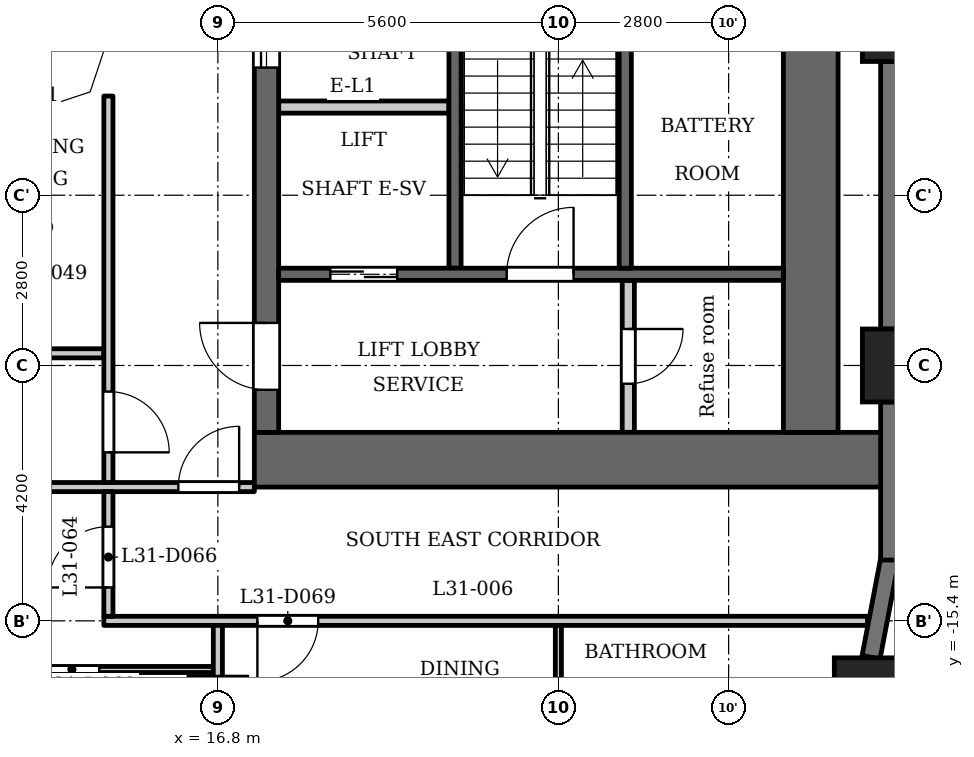
"""IFC4 building model, lengths in metres.
Left out: names, types, materials, properties, quantities, classifications, styles, units other than length and angle.
Written with IfcOpenShell. Run it as: python <this file> out.ifc"""

import sys

from ifc_helpers import new_model, si_unit, direction, frame, frame_2d, origin, origin_2d, place, context, subcontext, project, spatial, polyline, rectangle, outline, extrude, element, fill, save


model = new_model("IFC4")
c1 = context("Model", 3, precision=1e-05, world=origin(), true_north=direction((0.0, 1.0)))
c2 = subcontext(c1, "Body", "Model", "MODEL_VIEW")
j1 = project(units=[si_unit("LENGTHUNIT", "METRE"), si_unit("PLANEANGLEUNIT", "RADIAN")], contexts=[c1])
p1 = place(None, origin())
s1 = spatial("IfcSite", under=j1, at=p1, CompositionType="ELEMENT")
p2 = place(p1, origin())
s2 = spatial("IfcBuilding", under=s1, at=p2, CompositionType="ELEMENT")
p3 = place(p2, frame((0.0, 0.0, 121.8)))
s3 = spatial("IfcBuildingStorey", under=s2, at=p3, CompositionType="ELEMENT", Elevation=121.8)
for number, where, z_axis, x_axis in (
    (1, (27.538, -16.609, 0.0), (0.0, 0.0, 1.0), (1.0, 0.0, 0.0)),
    (2, (28.0, -11.2, 0.0), (0.0, 0.0, 1.0), (1.0, 0.0, 0.0)),
    (3, (28.0, -5.6, 0.0), (0.0, 0.0, 1.0), (1.0, 0.0, 0.0)),
):
    element("IfcColumn", number, at=place(p3, frame(where, z_axis=z_axis, x_axis=x_axis)), inside=s3, PredefinedType="COLUMN", context=c2, shape_type="SweptSolid", body=[
        extrude(rectangle(XDim=1.2, YDim=1.2, at=origin_2d()), origin(), (0.0, 0.0, 1.0), 3.5),
    ])
p4 = place(p3, frame((16.8, -16.8, 0.0), z_axis=(0.0, 0.0, 1.0), x_axis=(1.0, 0.0, 0.0)))
e4 = element("IfcColumn", 4, at=p4, inside=s3, PredefinedType="COLUMN", context=c2, shape_type="SweptSolid", body=[
    extrude(rectangle(XDim=0.95, YDim=0.95, at=origin_2d()), origin(), (0.0, 0.0, 1.0), 3.5),
])
p5 = place(p3, frame((27.542, -15.999, 0.0), z_axis=(0.0, 0.0, 1.0), x_axis=(0.187349172861, 0.982293381546, 0.0)))
e5 = element("IfcWall", 5, at=p5, inside=s3, PredefinedType="SOLIDWALL", context=c2, shape_type="SweptSolid", body=[
    extrude(rectangle(XDim=1.656, YDim=0.3, at=frame_2d((0.828, 0.0))), origin(), (0.0, 0.0, 1.0), 2.35),
])
p6 = place(p3, frame((27.85, -14.4, 0.0), z_axis=(0.0, 0.0, 1.0), x_axis=(0.0, 1.0, 0.0)))
e6 = element("IfcWall", 6, at=p6, inside=s3, PredefinedType="SOLIDWALL", context=c2, shape_type="SweptSolid", body=[
    extrude(rectangle(XDim=2.6, YDim=0.3, at=frame_2d((1.3, 0.0))), origin(), (0.0, 0.0, 1.0), 2.35),
])
p7 = place(p3, frame((27.85, -10.6, 0.0), z_axis=(0.0, 0.0, 1.0), x_axis=(0.0, 1.0, 0.0)))
e7 = element("IfcWall", 7, at=p7, inside=s3, PredefinedType="SOLIDWALL", context=c2, shape_type="SweptSolid", body=[
    extrude(rectangle(XDim=4.4, YDim=0.3, at=frame_2d((2.2, 0.0))), origin(), (0.0, 0.0, 1.0), 2.35),
])
p8 = place(p3, frame((20.7, -9.6, 0.0), z_axis=(0.0, 0.0, 1.0), x_axis=(0.0, 1.0, 0.0)))
e8 = element("IfcWall", 8, at=p8, inside=s3, PredefinedType="SHEAR", context=c2, shape_type="SweptSolid", body=[
    extrude(rectangle(XDim=9.75, YDim=0.2, at=frame_2d((4.875, 0.0))), origin(), (0.0, 0.0, 1.0), 3.15),
])
p9 = place(p3, frame((17.4, -12.75, 0.0), z_axis=(0.0, 0.0, 1.0), x_axis=(1.0, 0.0, 0.0)))
e9 = element("IfcWall", 9, at=p9, inside=s3, PredefinedType="SHEAR", context=c2, shape_type="SweptSolid", body=[
    extrude(rectangle(XDim=10.4, YDim=0.9, at=frame_2d((5.2, 0.0))), origin(), (0.0, 0.0, 1.0), 3.15),
])
p10 = place(p3, frame((17.6, -12.3, 0.0), z_axis=(0.0, 0.0, 1.0), x_axis=(0.0, 1.0, 0.0)))
e10 = element("IfcWall", 10, at=p10, inside=s3, PredefinedType="SHEAR", context=c2, shape_type="SweptSolid", body=[
    extrude(rectangle(XDim=24.6, YDim=0.4, at=frame_2d((12.3, 0.0))), origin(), (0.0, 0.0, 1.0), 3.15),
])
p11 = place(p10, frame((6.0, 0.0, 0.0)))
e11 = element("IfcOpeningElement", 11, at=p11, cuts=e10, PredefinedType="OPENING", context=c2, shape_type="SweptSolid", body=[
    extrude(rectangle(XDim=1.1, YDim=2.1, at=frame_2d((0.55, 1.05))), frame((0.0, 0.21, 0.0), z_axis=(0.0, -1.0, 0.0), x_axis=(1.0, 0.0, 0.0)), (0.0, 0.0, 1.0), 0.42),
])
p12 = place(p10, frame((8.4, 0.0, 0.0)))
e12 = element("IfcOpeningElement", 12, at=p12, cuts=e10, PredefinedType="OPENING", context=c2, shape_type="SweptSolid", body=[
    extrude(rectangle(XDim=1.1, YDim=2.1, at=frame_2d((0.55, 1.05))), frame((0.0, 0.21, 0.0), z_axis=(0.0, -1.0, 0.0), x_axis=(1.0, 0.0, 0.0)), (0.0, 0.0, 1.0), 0.42),
])
p13 = place(p10, frame((10.8, 0.0, 0.0)))
e13 = element("IfcOpeningElement", 13, at=p13, cuts=e10, PredefinedType="OPENING", context=c2, shape_type="SweptSolid", body=[
    extrude(rectangle(XDim=1.1, YDim=2.1, at=frame_2d((0.55, 1.05))), frame((0.0, 0.21, 0.0), z_axis=(0.0, -1.0, 0.0), x_axis=(1.0, 0.0, 0.0)), (0.0, 0.0, 1.0), 0.42),
])
p14 = place(p10, frame((22.8, 0.0, 0.0)))
e14 = element("IfcOpeningElement", 14, at=p14, cuts=e10, PredefinedType="OPENING", context=c2, shape_type="SweptSolid", body=[
    extrude(rectangle(XDim=1.1, YDim=2.1, at=frame_2d((0.55, 1.05))), frame((0.0, 0.21, 0.0), z_axis=(0.0, -1.0, 0.0), x_axis=(1.0, 0.0, 0.0)), (0.0, 0.0, 1.0), 0.42),
])
p15 = place(p10, frame((0.7, 0.0, 0.0)))
e15 = element("IfcOpeningElement", 15, at=p15, cuts=e10, PredefinedType="OPENING", context=c2, shape_type="SweptSolid", body=[
    extrude(rectangle(XDim=1.1, YDim=2.1, at=frame_2d((0.55, 1.05))), frame((0.0, 0.21, 0.0), z_axis=(0.0, -1.0, 0.0), x_axis=(1.0, 0.0, 0.0)), (0.0, 0.0, 1.0), 0.42),
])
p16 = place(p10, frame((12.775, 0.0, 0.0)))
e16 = element("IfcOpeningElement", 16, at=p16, cuts=e10, PredefinedType="OPENING", context=c2, shape_type="SweptSolid", body=[
    extrude(rectangle(XDim=1.8, YDim=2.1, at=frame_2d((0.9, 1.05))), frame((0.0, 0.21, 0.0), z_axis=(0.0, -1.0, 0.0), x_axis=(1.0, 0.0, 0.0)), (0.0, 0.0, 1.0), 0.42),
])
p17 = place(p3, frame((26.55, -12.3, 0.0), z_axis=(0.0, 0.0, 1.0), x_axis=(0.0, 1.0, 0.0)))
e17 = element("IfcWall", 17, at=p17, inside=s3, PredefinedType="SHEAR", context=c2, shape_type="SweptSolid", body=[
    extrude(rectangle(XDim=24.6, YDim=0.9, at=frame_2d((12.3, 0.0))), origin(), (0.0, 0.0, 1.0), 3.15),
])
p18 = place(p3, frame((23.55, -12.3, 0.0), z_axis=(0.0, 0.0, 1.0), x_axis=(0.0, 1.0, 0.0)))
e18 = element("IfcWall", 18, at=p18, inside=s3, PredefinedType="PARTITIONING", context=c2, shape_type="SweptSolid", body=[
    extrude(rectangle(XDim=2.5, YDim=0.2, at=frame_2d((1.25, 0.0))), origin(), (0.0, 0.0, 1.0), 3.15),
])
p19 = place(p18, frame((0.8, 0.0, 0.0)))
e19 = element("IfcOpeningElement", 19, at=p19, cuts=e18, PredefinedType="OPENING", context=c2, shape_type="SweptSolid", body=[
    extrude(rectangle(XDim=0.9, YDim=2.1, at=frame_2d((0.45, 1.05))), frame((0.0, 0.11, 0.0), z_axis=(0.0, -1.0, 0.0), x_axis=(1.0, 0.0, 0.0)), (0.0, 0.0, 1.0), 0.22),
])
p20 = place(p3, frame((17.8, -9.7, 0.0), z_axis=(0.0, 0.0, 1.0), x_axis=(1.0, 0.0, 0.0)))
e20 = element("IfcWall", 20, at=p20, inside=s3, PredefinedType="SHEAR", context=c2, shape_type="SweptSolid", body=[
    extrude(rectangle(XDim=8.3, YDim=0.2, at=frame_2d((4.15, 0.0))), origin(), (0.0, 0.0, 1.0), 3.15),
])
p21 = place(p20, frame((0.85, 0.0, 0.0)))
e21 = element("IfcOpeningElement", 21, at=p21, cuts=e20, PredefinedType="OPENING", context=c2, shape_type="SweptSolid", body=[
    extrude(rectangle(XDim=1.1, YDim=2.1, at=frame_2d((0.55, 1.05))), frame((0.0, 0.11, 0.0), z_axis=(0.0, -1.0, 0.0), x_axis=(1.0, 0.0, 0.0)), (0.0, 0.0, 1.0), 0.22),
])
p22 = place(p20, frame((3.75, 0.0, 0.0)))
e22 = element("IfcOpeningElement", 22, at=p22, cuts=e20, PredefinedType="OPENING", context=c2, shape_type="SweptSolid", body=[
    extrude(rectangle(XDim=1.1, YDim=2.1, at=frame_2d((0.55, 1.05))), frame((0.0, 0.11, 0.0), z_axis=(0.0, -1.0, 0.0), x_axis=(1.0, 0.0, 0.0)), (0.0, 0.0, 1.0), 0.22),
])
p23 = place(p3, frame((17.8, -6.95, 0.0), z_axis=(0.0, 0.0, 1.0), x_axis=(1.0, 0.0, 0.0)))
e23 = element("IfcWall", 23, at=p23, inside=s3, PredefinedType="PARTITIONING", context=c2, shape_type="SweptSolid", body=[
    extrude(rectangle(XDim=2.8, YDim=0.2, at=frame_2d((1.4, 0.0))), origin(), (0.0, 0.0, 1.0), 3.15),
])
p24 = place(p3, frame((23.5, -9.6, 0.0), z_axis=(0.0, 0.0, 1.0), x_axis=(0.0, 1.0, 0.0)))
e24 = element("IfcWall", 24, at=p24, inside=s3, PredefinedType="SHEAR", context=c2, shape_type="SweptSolid", body=[
    extrude(rectangle(XDim=6.9, YDim=0.2, at=frame_2d((3.45, 0.0))), origin(), (0.0, 0.0, 1.0), 3.15),
])
p25 = place(p3, frame((-16.725, -16.2, 0.0), z_axis=(0.0, 0.0, 1.0), x_axis=(1.0, 0.0, 0.0)))
e25 = element("IfcWall", 25, at=p25, inside=s3, PredefinedType="PARTITIONING", context=c2, shape_type="SweptSolid", body=[
    extrude(rectangle(XDim=33.45, YDim=0.1, at=frame_2d((16.725, 0.0))), origin(), (0.0, 0.0, 1.0), 3.15),
])
p26 = place(p25, frame((4.075, 0.0, 0.0)))
e26 = element("IfcOpeningElement", 26, at=p26, cuts=e25, PredefinedType="OPENING", context=c2, shape_type="SweptSolid", body=[
    extrude(rectangle(XDim=0.8, YDim=2.1, at=frame_2d((0.4, 1.05))), frame((0.0, 0.06, 0.0), z_axis=(0.0, -1.0, 0.0), x_axis=(1.0, 0.0, 0.0)), (0.0, 0.0, 1.0), 0.12),
])
p27 = place(p25, frame((9.425, 0.0, 0.0)))
e27 = element("IfcOpeningElement", 27, at=p27, cuts=e25, PredefinedType="OPENING", context=c2, shape_type="SweptSolid", body=[
    extrude(rectangle(XDim=0.9, YDim=2.1, at=frame_2d((0.45, 1.05))), frame((0.0, 0.06, 0.0), z_axis=(0.0, -1.0, 0.0), x_axis=(1.0, 0.0, 0.0)), (0.0, 0.0, 1.0), 0.12),
])
p28 = place(p25, frame((19.875, 0.0, 0.0)))
e28 = element("IfcOpeningElement", 28, at=p28, cuts=e25, PredefinedType="OPENING", context=c2, shape_type="SweptSolid", body=[
    extrude(rectangle(XDim=0.8, YDim=2.1, at=frame_2d((0.4, 1.05))), frame((0.0, 0.06, 0.0), z_axis=(0.0, -1.0, 0.0), x_axis=(1.0, 0.0, 0.0)), (0.0, 0.0, 1.0), 0.12),
])
p29 = place(p25, frame((17.375, 0.0, 0.0)))
e29 = element("IfcOpeningElement", 29, at=p29, cuts=e25, PredefinedType="OPENING", context=c2, shape_type="SweptSolid", body=[
    extrude(rectangle(XDim=0.9, YDim=2.1, at=frame_2d((0.45, 1.05))), frame((0.0, 0.06, 0.0), z_axis=(0.0, -1.0, 0.0), x_axis=(1.0, 0.0, 0.0)), (0.0, 0.0, 1.0), 0.12),
])
p30 = place(p25, frame((12.525, 0.0, 0.0)))
e30 = element("IfcOpeningElement", 30, at=p30, cuts=e25, PredefinedType="OPENING", context=c2, shape_type="SweptSolid", body=[
    extrude(rectangle(XDim=0.9, YDim=2.1, at=frame_2d((0.45, 1.05))), frame((0.0, 0.06, 0.0), z_axis=(0.0, -1.0, 0.0), x_axis=(1.0, 0.0, 0.0)), (0.0, 0.0, 1.0), 0.12),
])
p31 = place(p25, frame((14.775, 0.0, 0.0)))
e31 = element("IfcOpeningElement", 31, at=p31, cuts=e25, PredefinedType="OPENING", context=c2, shape_type="SweptSolid", body=[
    extrude(rectangle(XDim=0.9, YDim=2.1, at=frame_2d((0.45, 1.05))), frame((0.0, 0.06, 0.0), z_axis=(0.0, -1.0, 0.0), x_axis=(1.0, 0.0, 0.0)), (0.0, 0.0, 1.0), 0.12),
])
p32 = place(p25, frame((26.475, 0.0, 0.0)))
e32 = element("IfcOpeningElement", 32, at=p32, cuts=e25, PredefinedType="OPENING", context=c2, shape_type="SweptSolid", body=[
    extrude(rectangle(XDim=0.8, YDim=2.1, at=frame_2d((0.4, 1.05))), frame((0.0, 0.06, 0.0), z_axis=(0.0, -1.0, 0.0), x_axis=(1.0, 0.0, 0.0)), (0.0, 0.0, 1.0), 0.12),
])
p33 = place(p25, frame((23.725, 0.0, 0.0)))
e33 = element("IfcOpeningElement", 33, at=p33, cuts=e25, PredefinedType="OPENING", context=c2, shape_type="SweptSolid", body=[
    extrude(rectangle(XDim=0.9, YDim=2.1, at=frame_2d((0.45, 1.05))), frame((0.0, 0.06, 0.0), z_axis=(0.0, -1.0, 0.0), x_axis=(1.0, 0.0, 0.0)), (0.0, 0.0, 1.0), 0.12),
])
p34 = place(p25, frame((29.075, 0.0, 0.0)))
e34 = element("IfcOpeningElement", 34, at=p34, cuts=e25, PredefinedType="OPENING", context=c2, shape_type="SweptSolid", body=[
    extrude(rectangle(XDim=0.8, YDim=2.1, at=frame_2d((0.4, 1.05))), frame((0.0, 0.06, 0.0), z_axis=(0.0, -1.0, 0.0), x_axis=(1.0, 0.0, 0.0)), (0.0, 0.0, 1.0), 0.12),
])
p35 = place(p25, frame((30.675, 0.0, 0.0)))
e35 = element("IfcOpeningElement", 35, at=p35, cuts=e25, PredefinedType="OPENING", context=c2, shape_type="SweptSolid", body=[
    extrude(rectangle(XDim=0.9, YDim=2.1, at=frame_2d((0.45, 1.05))), frame((0.0, 0.06, 0.0), z_axis=(0.0, -1.0, 0.0), x_axis=(1.0, 0.0, 0.0)), (0.0, 0.0, 1.0), 0.12),
])
p36 = place(p3, frame((14.925, -15.4, 0.0), z_axis=(0.0, 0.0, 1.0), x_axis=(1.0, 0.0, 0.0)))
e36 = element("IfcWall", 36, at=p36, inside=s3, PredefinedType="PARTITIONING", context=c2, shape_type="SweptSolid", body=[
    extrude(rectangle(XDim=12.559, YDim=0.15, at=frame_2d((6.279, 0.0))), origin(), (0.0, 0.0, 1.0), 3.15),
])
p37 = place(p36, frame((2.525, 0.0, 0.0)))
e37 = element("IfcOpeningElement", 37, at=p37, cuts=e36, PredefinedType="OPENING", context=c2, shape_type="SweptSolid", body=[
    extrude(rectangle(XDim=1.0, YDim=2.1, at=frame_2d((0.5, 1.05))), frame((0.0, 0.085, 0.0), z_axis=(0.0, -1.0, 0.0), x_axis=(1.0, 0.0, 0.0)), (0.0, 0.0, 1.0), 0.17),
])
p38 = place(p3, frame((-17.4, -13.2, 0.0), z_axis=(0.0, 0.0, 1.0), x_axis=(1.0, 0.0, 0.0)))
e38 = element("IfcWall", 38, at=p38, inside=s3, PredefinedType="PARTITIONING", context=c2, shape_type="SweptSolid", body=[
    extrude(rectangle(XDim=34.8, YDim=0.15, at=frame_2d((17.4, 0.0))), origin(), (0.0, 0.0, 1.0), 3.15),
])
p39 = place(p38, frame((0.15, 0.0, 0.0)))
e39 = element("IfcOpeningElement", 39, at=p39, cuts=e38, PredefinedType="OPENING", context=c2, shape_type="SweptSolid", body=[
    extrude(rectangle(XDim=1.0, YDim=2.1, at=frame_2d((0.5, 1.05))), frame((0.0, 0.085, 0.0), z_axis=(0.0, -1.0, 0.0), x_axis=(1.0, 0.0, 0.0)), (0.0, 0.0, 1.0), 0.17),
])
p40 = place(p38, frame((33.55, 0.0, 0.0)))
e40 = element("IfcOpeningElement", 40, at=p40, cuts=e38, PredefinedType="OPENING", context=c2, shape_type="SweptSolid", body=[
    extrude(rectangle(XDim=1.0, YDim=2.1, at=frame_2d((0.5, 1.05))), frame((0.0, 0.085, 0.0), z_axis=(0.0, -1.0, 0.0), x_axis=(1.0, 0.0, 0.0)), (0.0, 0.0, 1.0), 0.17),
])
p41 = place(p38, frame((10.1, 0.0, 0.0)))
e41 = element("IfcOpeningElement", 41, at=p41, cuts=e38, PredefinedType="OPENING", context=c2, shape_type="SweptSolid", body=[
    extrude(rectangle(XDim=1.0, YDim=2.1, at=frame_2d((0.5, 1.05))), frame((0.0, 0.085, 0.0), z_axis=(0.0, -1.0, 0.0), x_axis=(1.0, 0.0, 0.0)), (0.0, 0.0, 1.0), 0.17),
])
p42 = place(p38, frame((15.7, 0.0, 0.0)))
e42 = element("IfcOpeningElement", 42, at=p42, cuts=e38, PredefinedType="OPENING", context=c2, shape_type="SweptSolid", body=[
    extrude(rectangle(XDim=1.0, YDim=2.1, at=frame_2d((0.5, 1.05))), frame((0.0, 0.085, 0.0), z_axis=(0.0, -1.0, 0.0), x_axis=(1.0, 0.0, 0.0)), (0.0, 0.0, 1.0), 0.17),
])
p43 = place(p38, frame((24.9, 0.0, 0.0)))
e43 = element("IfcOpeningElement", 43, at=p43, cuts=e38, PredefinedType="OPENING", context=c2, shape_type="SweptSolid", body=[
    extrude(rectangle(XDim=1.0, YDim=2.1, at=frame_2d((0.5, 1.05))), frame((0.0, 0.085, 0.0), z_axis=(0.0, -1.0, 0.0), x_axis=(1.0, 0.0, 0.0)), (0.0, 0.0, 1.0), 0.17),
])
p44 = place(p3, frame((-14.925, -11.0, 0.0), z_axis=(0.0, 0.0, 1.0), x_axis=(1.0, 0.0, 0.0)))
e44 = element("IfcWall", 44, at=p44, inside=s3, PredefinedType="PARTITIONING", context=c2, shape_type="SweptSolid", body=[
    extrude(rectangle(XDim=29.85, YDim=0.15, at=frame_2d((14.925, 0.0))), origin(), (0.0, 0.0, 1.0), 3.15),
])
p45 = place(p44, frame((5.275, 0.0, 0.0)))
e45 = element("IfcOpeningElement", 45, at=p45, cuts=e44, PredefinedType="OPENING", context=c2, shape_type="SweptSolid", body=[
    extrude(rectangle(XDim=1.0, YDim=2.1, at=frame_2d((0.5, 1.05))), frame((0.0, 0.085, 0.0), z_axis=(0.0, -1.0, 0.0), x_axis=(1.0, 0.0, 0.0)), (0.0, 0.0, 1.0), 0.17),
])
p46 = place(p44, frame((15.475, 0.0, 0.0)))
e46 = element("IfcOpeningElement", 46, at=p46, cuts=e44, PredefinedType="OPENING", context=c2, shape_type="SweptSolid", body=[
    extrude(rectangle(XDim=1.0, YDim=2.1, at=frame_2d((0.5, 1.05))), frame((0.0, 0.085, 0.0), z_axis=(0.0, -1.0, 0.0), x_axis=(1.0, 0.0, 0.0)), (0.0, 0.0, 1.0), 0.17),
])
p47 = place(p44, frame((24.475, 0.0, 0.0)))
e47 = element("IfcOpeningElement", 47, at=p47, cuts=e44, PredefinedType="OPENING", context=c2, shape_type="SweptSolid", body=[
    extrude(rectangle(XDim=1.0, YDim=2.1, at=frame_2d((0.5, 1.05))), frame((0.0, 0.085, 0.0), z_axis=(0.0, -1.0, 0.0), x_axis=(1.0, 0.0, 0.0)), (0.0, 0.0, 1.0), 0.17),
])
p48 = place(p3, frame((15.0, -15.325, 0.0), z_axis=(0.0, 0.0, 1.0), x_axis=(0.0, 1.0, 0.0)))
e48 = element("IfcWall", 48, at=p48, inside=s3, PredefinedType="PARTITIONING", context=c2, shape_type="SweptSolid", body=[
    extrude(rectangle(XDim=2.05, YDim=0.15, at=frame_2d((1.025, 0.0))), origin(), (0.0, 0.0, 1.0), 3.15),
])
p49 = place(p48, frame((0.474, 0.0, 0.0)))
e49 = element("IfcOpeningElement", 49, at=p49, cuts=e48, PredefinedType="OPENING", context=c2, shape_type="SweptSolid", body=[
    extrude(rectangle(XDim=1.0, YDim=2.1, at=frame_2d((0.5, 1.05))), frame((0.0, 0.085, 0.0), z_axis=(0.0, -1.0, 0.0), x_axis=(1.0, 0.0, 0.0)), (0.0, 0.0, 1.0), 0.17),
])
p50 = place(p3, frame((15.0, -13.125, 0.0), z_axis=(0.0, 0.0, 1.0), x_axis=(0.0, 1.0, 0.0)))
e50 = element("IfcWall", 50, at=p50, inside=s3, PredefinedType="PARTITIONING", context=c2, shape_type="SweptSolid", body=[
    extrude(rectangle(XDim=6.356, YDim=0.15, at=frame_2d((3.178, 0.0))), origin(), (0.0, 0.0, 1.0), 3.15),
])
p51 = place(p50, frame((0.496, 0.0, 0.0)))
e51 = element("IfcOpeningElement", 51, at=p51, cuts=e50, PredefinedType="OPENING", context=c2, shape_type="SweptSolid", body=[
    extrude(rectangle(XDim=1.0, YDim=2.1, at=frame_2d((0.5, 1.05))), frame((0.0, 0.085, 0.0), z_axis=(0.0, -1.0, 0.0), x_axis=(1.0, 0.0, 0.0)), (0.0, 0.0, 1.0), 0.17),
])
p52 = place(p3, frame((16.8, -22.98, 0.0), z_axis=(0.0, 0.0, 1.0), x_axis=(0.0, 1.0, 0.0)))
e52 = element("IfcWall", 52, at=p52, inside=s3, PredefinedType="PARTITIONING", context=c2, shape_type="SweptSolid", body=[
    extrude(rectangle(XDim=7.505, YDim=0.15, at=frame_2d((3.752, 0.0))), origin(), (0.0, 0.0, 1.0), 3.15),
])
p53 = place(p3, frame((22.4, -17.75, 0.0), z_axis=(0.0, 0.0, 1.0), x_axis=(0.0, 1.0, 0.0)))
e53 = element("IfcWall", 53, at=p53, inside=s3, PredefinedType="PARTITIONING", context=c2, shape_type="SweptSolid", body=[
    extrude(rectangle(XDim=2.275, YDim=0.1, at=frame_2d((1.137, 0.0))), origin(), (0.0, 0.0, 1.0), 3.15),
])
p54 = place(p3, origin())
e54 = element("IfcWall", 54, at=p54, inside=s3, PredefinedType="SOLIDWALL", context=c2, shape_type="SweptSolid", body=[
    extrude(outline(polyline([(14.937, -6.937), (15.3, -5.849), (15.3, -5.8), (15.0, -5.8), (14.7, -6.7), (13.8, -7.0), (13.8, -7.3), (13.849, -7.3), (14.937, -6.937)])), origin(), (0.0, 0.0, 1.0), 3.15),
])
p55 = place(p21, origin())
e55 = element("IfcDoor", 55, at=p55, inside=s3, OperationType="DOUBLE_DOOR_SLIDING", PredefinedType="DOOR", context=c2, shape_type="SweptSolid", body=[
    extrude(rectangle(XDim=1.1, YDim=2.1, at=frame_2d((0.55, 1.05))), frame((0.0, 0.025, 0.0), z_axis=(0.0, -1.0, 0.0), x_axis=(1.0, 0.0, 0.0)), (0.0, 0.0, 1.0), 0.05),
])
fill(e21, e55)
p56 = place(p11, origin())
e56 = element("IfcDoor", 56, at=p56, inside=s3, OperationType="DOUBLE_DOOR_SLIDING", PredefinedType="DOOR", context=c2, shape_type="SweptSolid", body=[
    extrude(rectangle(XDim=1.1, YDim=2.1, at=frame_2d((0.55, 1.05))), frame((0.0, 0.025, 0.0), z_axis=(0.0, -1.0, 0.0), x_axis=(1.0, 0.0, 0.0)), (0.0, 0.0, 1.0), 0.05),
])
fill(e11, e56)
p57 = place(p15, origin())
e57 = element("IfcDoor", 57, at=p57, inside=s3, OperationType="SINGLE_SWING_LEFT", PredefinedType="DOOR", context=c2, shape_type="SweptSolid", body=[
    extrude(rectangle(XDim=1.1, YDim=2.1, at=frame_2d((0.55, 1.05))), frame((0.0, 0.025, 0.0), z_axis=(0.0, -1.0, 0.0), x_axis=(1.0, 0.0, 0.0)), (0.0, 0.0, 1.0), 0.05),
])
fill(e15, e57)
p58 = place(p19, origin())
e58 = element("IfcDoor", 58, at=p58, inside=s3, OperationType="SINGLE_SWING_RIGHT", PredefinedType="DOOR", context=c2, shape_type="SweptSolid", body=[
    extrude(rectangle(XDim=0.9, YDim=2.1, at=frame_2d((0.45, 1.05))), frame((0.0, 0.025, 0.0), z_axis=(0.0, -1.0, 0.0), x_axis=(1.0, 0.0, 0.0)), (0.0, 0.0, 1.0), 0.05),
])
fill(e19, e58)
p59 = place(p22, origin())
e59 = element("IfcDoor", 59, at=p59, inside=s3, OperationType="SINGLE_SWING_LEFT", PredefinedType="DOOR", context=c2, shape_type="SweptSolid", body=[
    extrude(rectangle(XDim=1.1, YDim=2.1, at=frame_2d((0.55, 1.05))), frame((0.0, 0.025, 0.0), z_axis=(0.0, -1.0, 0.0), x_axis=(1.0, 0.0, 0.0)), (0.0, 0.0, 1.0), 0.05),
])
fill(e22, e59)
p60 = place(p51, origin())
e60 = element("IfcDoor", 60, at=p60, inside=s3, OperationType="SINGLE_SWING_LEFT", PredefinedType="DOOR", context=c2, shape_type="SweptSolid", body=[
    extrude(rectangle(XDim=1.0, YDim=2.1, at=frame_2d((0.5, 1.05))), frame((0.0, 0.025, 0.0), z_axis=(0.0, -1.0, 0.0), x_axis=(1.0, 0.0, 0.0)), (0.0, 0.0, 1.0), 0.05),
])
fill(e51, e60)
p61 = place(p40, origin())
e61 = element("IfcDoor", 61, at=p61, inside=s3, OperationType="SINGLE_SWING_LEFT", PredefinedType="DOOR", context=c2, shape_type="SweptSolid", body=[
    extrude(rectangle(XDim=1.0, YDim=2.1, at=frame_2d((0.5, 1.05))), frame((0.0, 0.025, 0.0), z_axis=(0.0, -1.0, 0.0), x_axis=(1.0, 0.0, 0.0)), (0.0, 0.0, 1.0), 0.05),
])
fill(e40, e61)
p62 = place(p49, origin())
e62 = element("IfcDoor", 62, at=p62, inside=s3, OperationType="SINGLE_SWING_RIGHT", PredefinedType="DOOR", context=c2, shape_type="SweptSolid", body=[
    extrude(rectangle(XDim=1.0, YDim=2.1, at=frame_2d((0.5, 1.05))), frame((0.0, 0.025, 0.0), z_axis=(0.0, -1.0, 0.0), x_axis=(1.0, 0.0, 0.0)), (0.0, 0.0, 1.0), 0.05),
])
fill(e49, e62)
p63 = place(p35, origin())
e63 = element("IfcDoor", 63, at=p63, inside=s3, OperationType="SINGLE_SWING_LEFT", PredefinedType="DOOR", context=c2, shape_type="SweptSolid", body=[
    extrude(rectangle(XDim=0.9, YDim=2.1, at=frame_2d((0.45, 1.05))), frame((0.0, 0.025, 0.0), z_axis=(0.0, -1.0, 0.0), x_axis=(1.0, 0.0, 0.0)), (0.0, 0.0, 1.0), 0.05),
])
fill(e35, e63)
p64 = place(p37, origin())
e64 = element("IfcDoor", 64, at=p64, inside=s3, OperationType="SINGLE_SWING_LEFT", PredefinedType="DOOR", context=c2, shape_type="SweptSolid", body=[
    extrude(rectangle(XDim=1.0, YDim=2.1, at=frame_2d((0.5, 1.05))), frame((0.0, 0.025, 0.0), z_axis=(0.0, -1.0, 0.0), x_axis=(1.0, 0.0, 0.0)), (0.0, 0.0, 1.0), 0.05),
])
fill(e37, e64)
save(model, sys.argv[1])
